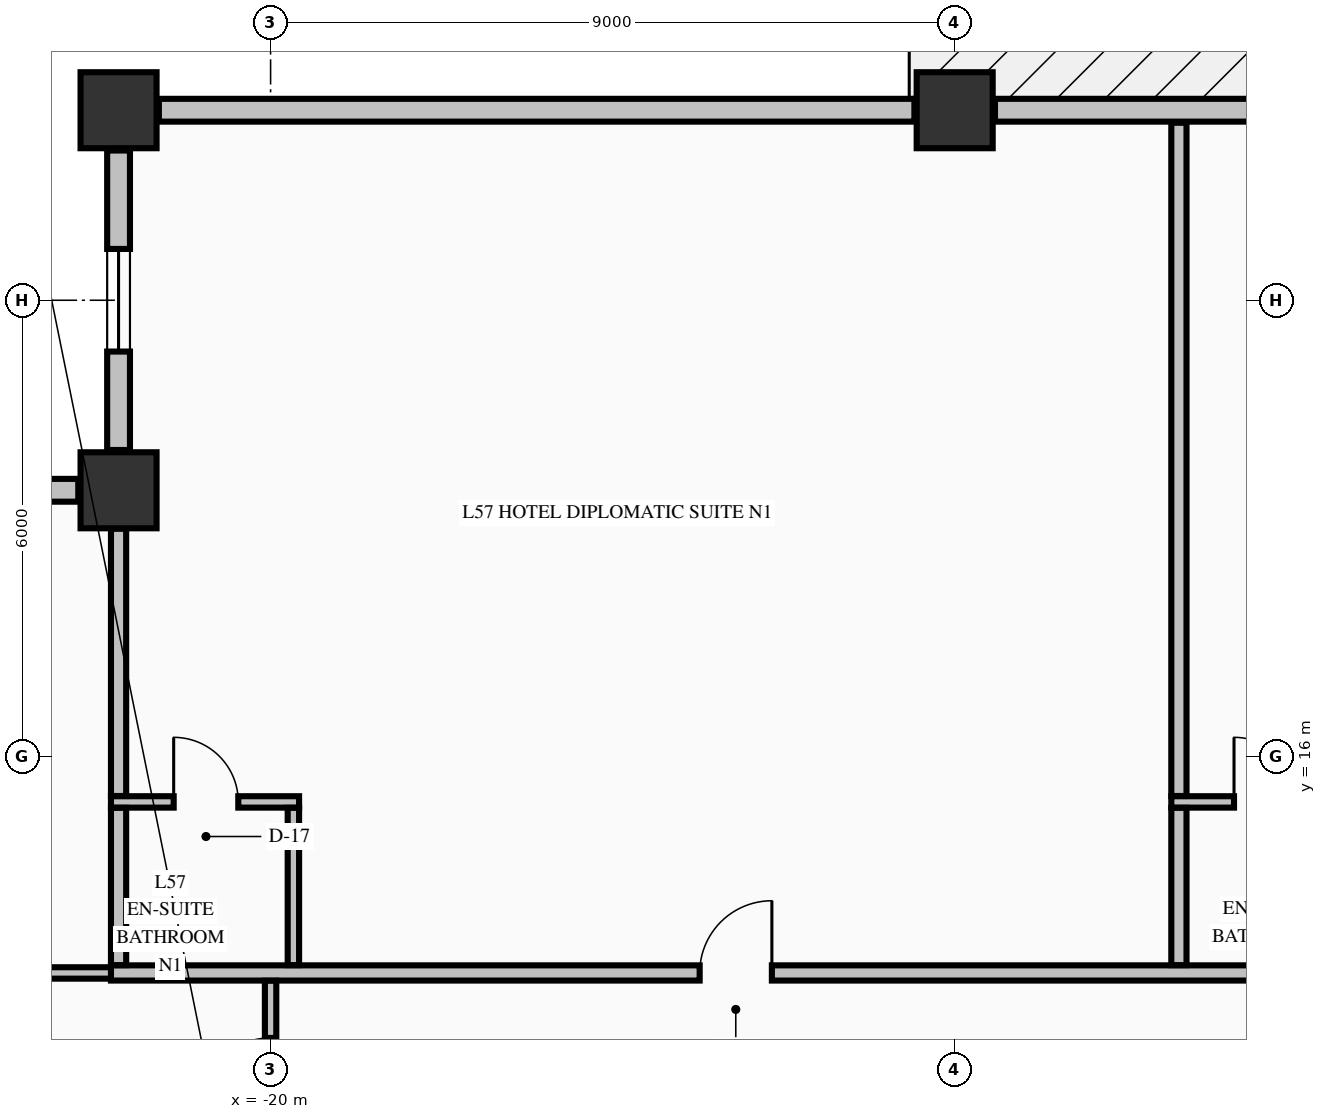
"""IFC4 building model, lengths in metres.
Left out: names, types, materials, properties, quantities, classifications, styles, units other than length and angle.
Written with IfcOpenShell. Run it as: python <this file> out.ifc"""

import sys

from ifc_helpers import new_model, si_unit, direction, frame, frame_2d, origin, origin_2d, place, context, subcontext, project, spatial, rectangle, extrude, element, fill, save


model = new_model("IFC4")
c1 = context("Model", 3, precision=1e-05, world=origin(), true_north=direction((0.0, 1.0)))
c2 = subcontext(c1, "Body", "Model", "MODEL_VIEW")
j1 = project(units=[si_unit("LENGTHUNIT", "METRE"), si_unit("PLANEANGLEUNIT", "RADIAN")], contexts=[c1])
p1 = place(None, origin())
s1 = spatial("IfcSite", under=j1, at=p1, CompositionType="ELEMENT")
p2 = place(p1, origin())
s2 = spatial("IfcBuilding", under=s1, at=p2, CompositionType="ELEMENT")
p3 = place(p2, frame((0.0, 0.0, 218.66)))
s3 = spatial("IfcBuildingStorey", under=s2, at=p3, CompositionType="ELEMENT", Elevation=218.66)
for number, where, z_axis, x_axis in (
    (1, (-22.0, 24.5, -0.25), (0.0, 0.0, 1.0), (1.0, 0.0, 0.0)),
    (2, (-11.0, 24.5, -0.25), (0.0, 0.0, 1.0), (1.0, 0.0, 0.0)),
    (3, (-22.0, 19.5, -0.25), (0.0, 0.0, 1.0), (1.0, 0.0, 0.0)),
):
    element("IfcColumn", number, at=place(p3, frame(where, z_axis=z_axis, x_axis=x_axis)), inside=s3, PredefinedType="COLUMN", context=c2, shape_type="SweptSolid", body=[
        extrude(rectangle(XDim=1.0, YDim=1.0, at=origin_2d()), origin(), (0.0, 0.0, 1.0), 3.225),
    ])
p4 = place(p3, frame((-22.0, 23.97, 0.0), z_axis=(0.0, 0.0, 1.0), x_axis=(0.0, -1.0, 0.0)))
e4 = element("IfcWall", 4, at=p4, inside=s3, PredefinedType="STANDARD", context=c2, shape_type="SweptSolid", body=[
    extrude(rectangle(XDim=3.94, YDim=0.3, at=frame_2d((1.97, 0.0))), origin(), (0.0, 0.0, 1.0), 2.367),
])
p5 = place(p4, frame((1.295, 0.0, 0.68)))
e5 = element("IfcOpeningElement", 5, at=p5, cuts=e4, PredefinedType="OPENING", context=c2, shape_type="SweptSolid", body=[
    extrude(rectangle(XDim=1.35, YDim=1.42, at=frame_2d((0.675, 0.71))), frame((0.0, 0.16, 0.0), z_axis=(0.0, -1.0, 0.0), x_axis=(1.0, 0.0, 0.0)), (0.0, 0.0, 1.0), 0.32),
])
p6 = place(p3, frame((-22.53, 19.5, 0.0), z_axis=(0.0, 0.0, 1.0), x_axis=(-1.0, 0.0, 0.0)))
e6 = element("IfcWall", 6, at=p6, inside=s3, PredefinedType="STANDARD", context=c2, shape_type="SweptSolid", body=[
    extrude(rectangle(XDim=3.94, YDim=0.3, at=frame_2d((1.97, 0.0))), origin(), (0.0, 0.0, 1.0), 2.367),
])
p7 = place(p6, frame((1.295, 0.0, 0.68)))
e7 = element("IfcOpeningElement", 7, at=p7, cuts=e6, PredefinedType="OPENING", context=c2, shape_type="SweptSolid", body=[
    extrude(rectangle(XDim=1.35, YDim=1.42, at=frame_2d((0.675, 0.71))), frame((0.0, 0.16, 0.0), z_axis=(0.0, -1.0, 0.0), x_axis=(1.0, 0.0, 0.0)), (0.0, 0.0, 1.0), 0.32),
])
p8 = place(p3, frame((-11.53, 24.5, 0.0), z_axis=(0.0, 0.0, 1.0), x_axis=(-1.0, 0.0, 0.0)))
e8 = element("IfcWall", 8, at=p8, inside=s3, PredefinedType="STANDARD", context=c2, shape_type="SweptSolid", body=[
    extrude(rectangle(XDim=9.94, YDim=0.3, at=frame_2d((4.97, 0.0))), origin(), (0.0, 0.0, 1.0), 2.367),
])
p9 = place(p3, frame((-0.53, 24.5, 0.0), z_axis=(0.0, 0.0, 1.0), x_axis=(-1.0, 0.0, 0.0)))
e9 = element("IfcWall", 9, at=p9, inside=s3, PredefinedType="STANDARD", context=c2, shape_type="SweptSolid", body=[
    extrude(rectangle(XDim=9.94, YDim=0.3, at=frame_2d((4.97, 0.0))), origin(), (0.0, 0.0, 1.0), 2.367),
])
p10 = place(p9, frame((0.2, 0.0, 0.0)))
e10 = element("IfcOpeningElement", 10, at=p10, cuts=e9, PredefinedType="OPENING", context=c2, shape_type="SweptSolid", body=[
    extrude(rectangle(XDim=1.1, YDim=2.15, at=frame_2d((0.55, 1.075))), frame((0.0, 0.16, 0.0), z_axis=(0.0, -1.0, 0.0), x_axis=(1.0, 0.0, 0.0)), (0.0, 0.0, 1.0), 0.32),
])
p11 = place(p3, frame((-26.835, 13.15, 0.0), z_axis=(0.0, 0.0, 1.0), x_axis=(1.0, 0.0, 0.0)))
e11 = element("IfcWall", 11, at=p11, inside=s3, PredefinedType="PARTITIONING", context=c2, shape_type="SweptSolid", body=[
    extrude(rectangle(XDim=4.935, YDim=0.15, at=frame_2d((2.468, 0.0))), origin(), (0.0, 0.0, 1.0), 2.975),
])
p12 = place(p3, frame((-22.1, 13.15, 0.0), z_axis=(0.0, 0.0, 1.0), x_axis=(1.0, 0.0, 0.0)))
e12 = element("IfcWall", 12, at=p12, inside=s3, PredefinedType="PARTITIONING", context=c2, shape_type="SweptSolid", body=[
    extrude(rectangle(XDim=39.2, YDim=0.2, at=frame_2d((19.6, 0.0))), origin(), (0.0, 0.0, 1.0), 2.975),
])
p13 = place(p12, frame((7.745, 0.0, 0.0)))
e13 = element("IfcOpeningElement", 13, at=p13, cuts=e12, PredefinedType="OPENING", context=c2, shape_type="SweptSolid", body=[
    extrude(rectangle(XDim=0.95, YDim=2.15, at=frame_2d((0.475, 1.075))), frame((0.0, 0.11, 0.0), z_axis=(0.0, -1.0, 0.0), x_axis=(1.0, 0.0, 0.0)), (0.0, 0.0, 1.0), 0.22),
])
p14 = place(p12, frame((17.525, 0.0, 0.0)))
e14 = element("IfcOpeningElement", 14, at=p14, cuts=e12, PredefinedType="OPENING", context=c2, shape_type="SweptSolid", body=[
    extrude(rectangle(XDim=0.95, YDim=2.15, at=frame_2d((0.475, 1.075))), frame((0.0, 0.11, 0.0), z_axis=(0.0, -1.0, 0.0), x_axis=(1.0, 0.0, 0.0)), (0.0, 0.0, 1.0), 0.22),
])
p15 = place(p12, frame((34.225, 0.0, 0.0)))
e15 = element("IfcOpeningElement", 15, at=p15, cuts=e12, PredefinedType="OPENING", context=c2, shape_type="SweptSolid", body=[
    extrude(rectangle(XDim=0.95, YDim=2.15, at=frame_2d((0.475, 1.075))), frame((0.0, 0.11, 0.0), z_axis=(0.0, -1.0, 0.0), x_axis=(1.0, 0.0, 0.0)), (0.0, 0.0, 1.0), 0.22),
])
p16 = place(p3, frame((-22.1, 15.4, 0.0), z_axis=(0.0, 0.0, 1.0), x_axis=(1.0, 0.0, 0.0)))
e16 = element("IfcWall", 16, at=p16, inside=s3, PredefinedType="PARTITIONING", context=c2, shape_type="SweptSolid", body=[
    extrude(rectangle(XDim=2.475, YDim=0.15, at=frame_2d((1.238, 0.0))), origin(), (0.0, 0.0, 1.0), 2.975),
])
p17 = place(p16, frame((0.825, 0.0, 0.0)))
e17 = element("IfcOpeningElement", 17, at=p17, cuts=e16, PredefinedType="OPENING", context=c2, shape_type="SweptSolid", body=[
    extrude(rectangle(XDim=0.85, YDim=2.1, at=frame_2d((0.425, 1.05))), frame((0.0, 0.085, 0.0), z_axis=(0.0, -1.0, 0.0), x_axis=(1.0, 0.0, 0.0)), (0.0, 0.0, 1.0), 0.17),
])
p18 = place(p3, frame((-8.15, 15.4, 0.0), z_axis=(0.0, 0.0, 1.0), x_axis=(1.0, 0.0, 0.0)))
e18 = element("IfcWall", 18, at=p18, inside=s3, PredefinedType="PARTITIONING", context=c2, shape_type="SweptSolid", body=[
    extrude(rectangle(XDim=2.475, YDim=0.15, at=frame_2d((1.237, 0.0))), origin(), (0.0, 0.0, 1.0), 2.975),
])
p19 = place(p18, frame((0.825, 0.0, 0.0)))
e19 = element("IfcOpeningElement", 19, at=p19, cuts=e18, PredefinedType="OPENING", context=c2, shape_type="SweptSolid", body=[
    extrude(rectangle(XDim=0.85, YDim=2.1, at=frame_2d((0.425, 1.05))), frame((0.0, 0.085, 0.0), z_axis=(0.0, -1.0, 0.0), x_axis=(1.0, 0.0, 0.0)), (0.0, 0.0, 1.0), 0.17),
])
p20 = place(p3, frame((-22.0, 13.253, 0.0), z_axis=(0.0, 0.0, 1.0), x_axis=(0.0, 1.0, 0.0)))
e20 = element("IfcWall", 20, at=p20, inside=s3, PredefinedType="PARTITIONING", context=c2, shape_type="SweptSolid", body=[
    extrude(rectangle(XDim=2.069, YDim=0.2, at=frame_2d((1.035, 0.0))), origin(), (0.0, 0.0, 1.0), 2.975),
])
p21 = place(p3, frame((-22.0, 15.478, 0.0), z_axis=(0.0, 0.0, 1.0), x_axis=(0.0, 1.0, 0.0)))
e21 = element("IfcWall", 21, at=p21, inside=s3, PredefinedType="PARTITIONING", context=c2, shape_type="SweptSolid", body=[
    extrude(rectangle(XDim=3.516, YDim=0.2, at=frame_2d((1.758, 0.0))), origin(), (0.0, 0.0, 1.0), 2.975),
])
p22 = place(p3, frame((-20.0, 10.931, 0.0), z_axis=(0.0, 0.0, 1.0), x_axis=(0.0, 1.0, 0.0)))
e22 = element("IfcWall", 22, at=p22, inside=s3, PredefinedType="PARTITIONING", context=c2, shape_type="SweptSolid", body=[
    extrude(rectangle(XDim=2.116, YDim=0.15, at=frame_2d((1.058, 0.0))), origin(), (0.0, 0.0, 1.0), 2.167),
])
p23 = place(p22, frame((0.414, 0.0, 0.0)))
e23 = element("IfcOpeningElement", 23, at=p23, cuts=e22, PredefinedType="OPENING", context=c2, shape_type="SweptSolid", body=[
    extrude(rectangle(XDim=0.95, YDim=2.02, at=frame_2d((0.475, 1.01))), frame((0.0, 0.085, 0.0), z_axis=(0.0, -1.0, 0.0), x_axis=(1.0, 0.0, 0.0)), (0.0, 0.0, 1.0), 0.17),
])
p24 = place(p3, frame((-19.7, 13.253, 0.0), z_axis=(0.0, 0.0, 1.0), x_axis=(0.0, 1.0, 0.0)))
e24 = element("IfcWall", 24, at=p24, inside=s3, PredefinedType="PARTITIONING", context=c2, shape_type="SweptSolid", body=[
    extrude(rectangle(XDim=2.069, YDim=0.15, at=frame_2d((1.035, 0.0))), origin(), (0.0, 0.0, 1.0), 2.167),
])
p25 = place(p3, frame((-8.05, 13.253, 0.0), z_axis=(0.0, 0.0, 1.0), x_axis=(0.0, 1.0, 0.0)))
e25 = element("IfcWall", 25, at=p25, inside=s3, PredefinedType="PARTITIONING", context=c2, shape_type="SweptSolid", body=[
    extrude(rectangle(XDim=2.069, YDim=0.2, at=frame_2d((1.035, 0.0))), origin(), (0.0, 0.0, 1.0), 2.975),
])
p26 = place(p3, frame((-8.05, 15.478, 0.0), z_axis=(0.0, 0.0, 1.0), x_axis=(0.0, 1.0, 0.0)))
e26 = element("IfcWall", 26, at=p26, inside=s3, PredefinedType="PARTITIONING", context=c2, shape_type="SweptSolid", body=[
    extrude(rectangle(XDim=8.857, YDim=0.2, at=frame_2d((4.428, 0.0))), origin(), (0.0, 0.0, 1.0), 2.975),
])
p27 = place(p5, origin())
e27 = element("IfcWindow", 27, at=p27, inside=s3, PartitioningType="SINGLE_PANEL", PredefinedType="WINDOW", context=c2, shape_type="SweptSolid", body=[
    extrude(rectangle(XDim=1.35, YDim=1.42, at=frame_2d((0.675, 0.71))), frame((0.0, 0.03, 0.0), z_axis=(0.0, -1.0, 0.0), x_axis=(1.0, 0.0, 0.0)), (0.0, 0.0, 1.0), 0.06),
])
fill(e5, e27)
p28 = place(p13, origin())
e28 = element("IfcDoor", 28, at=p28, inside=s3, OperationType="SINGLE_SWING_RIGHT", PredefinedType="DOOR", context=c2, shape_type="SweptSolid", body=[
    extrude(rectangle(XDim=0.95, YDim=2.15, at=frame_2d((0.475, 1.075))), frame((0.0, 0.025, 0.0), z_axis=(0.0, -1.0, 0.0), x_axis=(1.0, 0.0, 0.0)), (0.0, 0.0, 1.0), 0.05),
])
fill(e13, e28)
p29 = place(p17, origin())
e29 = element("IfcDoor", 29, at=p29, inside=s3, OperationType="SINGLE_SWING_LEFT", PredefinedType="DOOR", context=c2, shape_type="SweptSolid", body=[
    extrude(rectangle(XDim=0.85, YDim=2.1, at=frame_2d((0.425, 1.05))), frame((0.0, 0.025, 0.0), z_axis=(0.0, -1.0, 0.0), x_axis=(1.0, 0.0, 0.0)), (0.0, 0.0, 1.0), 0.05),
])
fill(e17, e29)
p30 = place(p19, origin())
e30 = element("IfcDoor", 30, at=p30, inside=s3, OperationType="SINGLE_SWING_LEFT", PredefinedType="DOOR", context=c2, shape_type="SweptSolid", body=[
    extrude(rectangle(XDim=0.85, YDim=2.1, at=frame_2d((0.425, 1.05))), frame((0.0, 0.025, 0.0), z_axis=(0.0, -1.0, 0.0), x_axis=(1.0, 0.0, 0.0)), (0.0, 0.0, 1.0), 0.05),
])
fill(e19, e30)
p31 = place(p23, origin())
e31 = element("IfcDoor", 31, at=p31, inside=s3, OperationType="SINGLE_SWING_LEFT", PredefinedType="DOOR", context=c2, shape_type="SweptSolid", body=[
    extrude(rectangle(XDim=0.95, YDim=2.02, at=frame_2d((0.475, 1.01))), frame((0.0, 0.025, 0.0), z_axis=(0.0, -1.0, 0.0), x_axis=(1.0, 0.0, 0.0)), (0.0, 0.0, 1.0), 0.05),
])
fill(e23, e31)
save(model, sys.argv[1])
